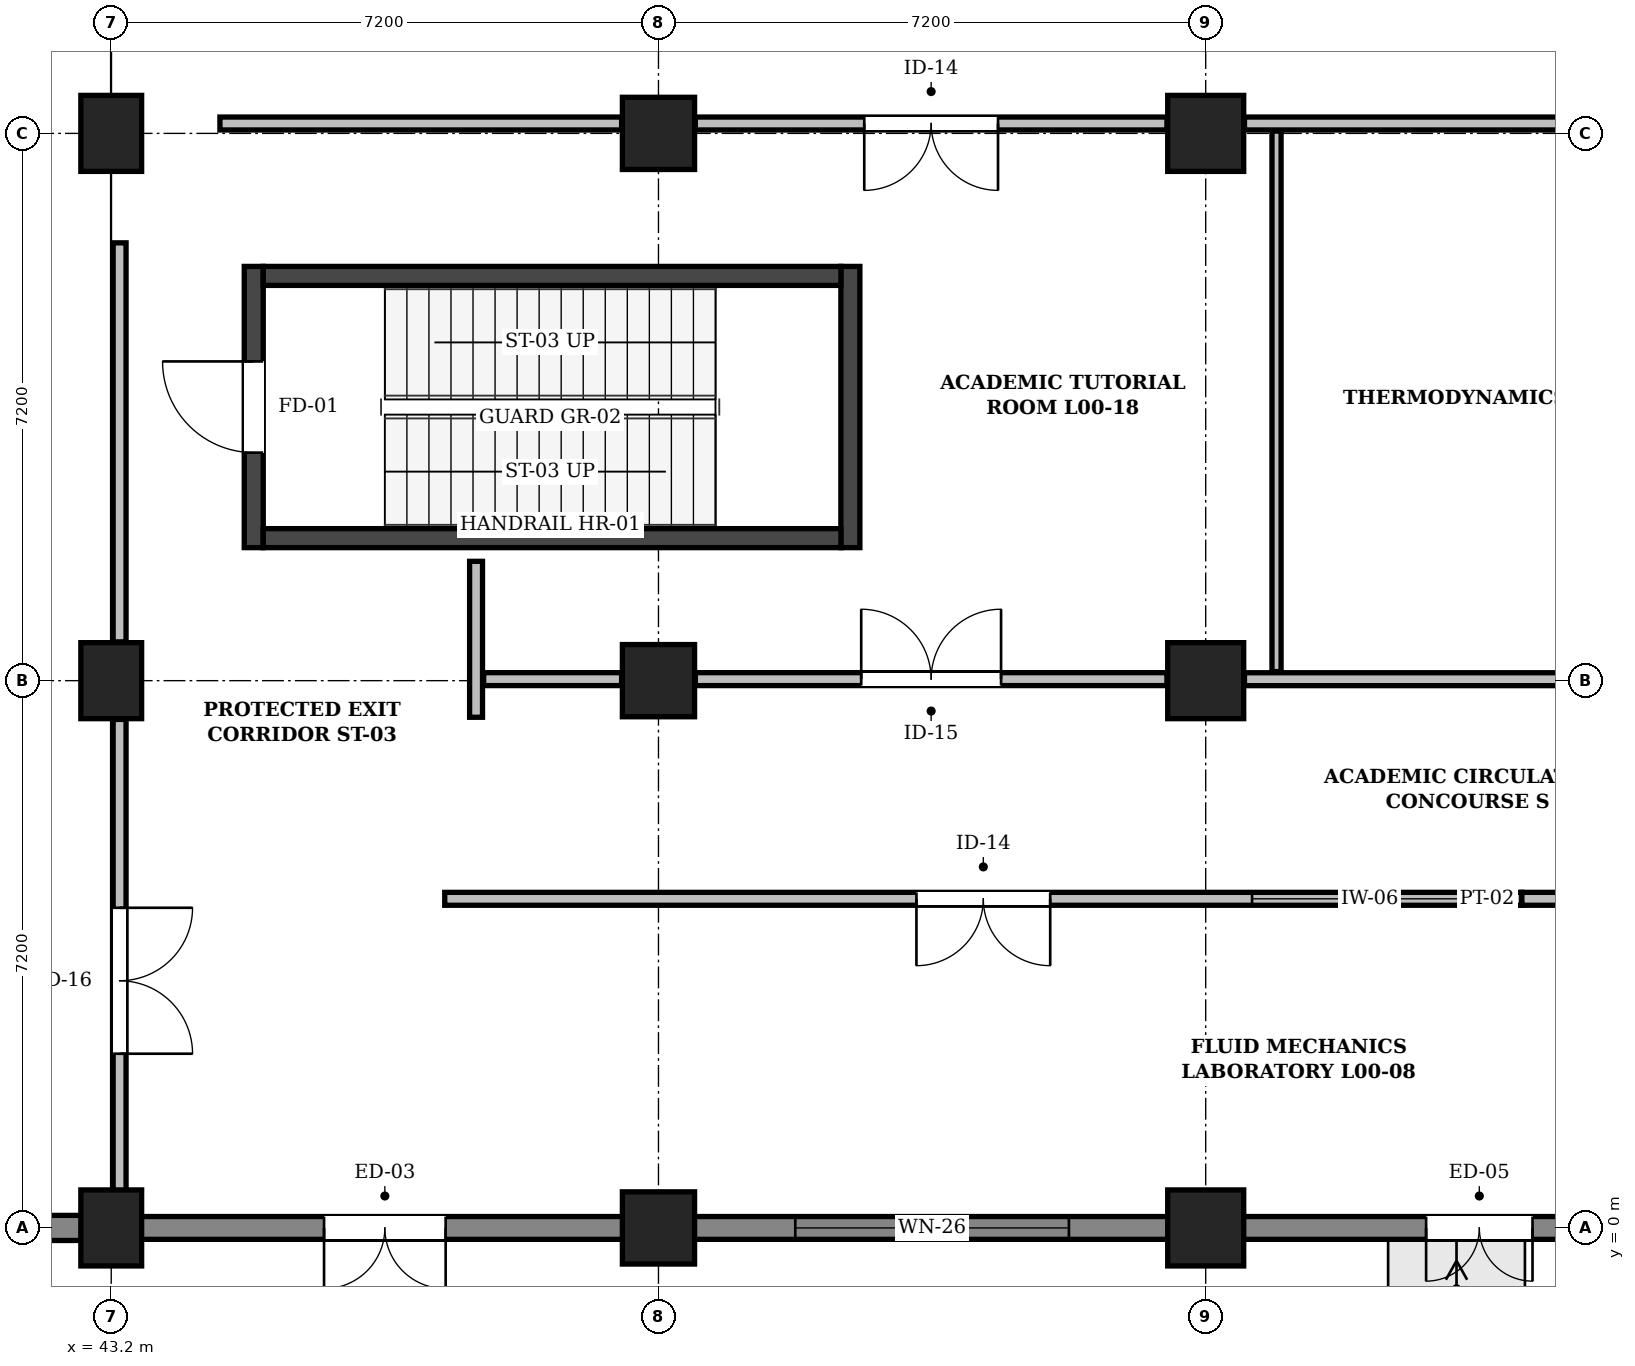
"""IFC4 building model, lengths in metres.
Left out: names, types, materials, properties, quantities, classifications, styles, units other than length and angle.
Written with IfcOpenShell. Run it as: python <this file> out.ifc"""

import sys

from ifc_helpers import new_model, si_unit, direction, frame, frame_2d, origin, origin_2d, place, context, subcontext, project, spatial, rectangle, extrude, element, fill, save


model = new_model("IFC4")
c1 = context("Model", 3, precision=1e-05, world=origin(), true_north=direction((0.0, 1.0)))
c2 = subcontext(c1, "Body", "Model", "MODEL_VIEW")
j1 = project(units=[si_unit("LENGTHUNIT", "METRE"), si_unit("PLANEANGLEUNIT", "RADIAN")], contexts=[c1])
p1 = place(None, origin())
s1 = spatial("IfcSite", under=j1, at=p1, CompositionType="ELEMENT")
p2 = place(p1, origin())
s2 = spatial("IfcBuilding", under=s1, at=p2, CompositionType="ELEMENT")
p3 = place(p2, origin())
s3 = spatial("IfcBuildingStorey", under=s2, at=p3, CompositionType="ELEMENT", Elevation=0.0)
for number, where, z_axis, x_axis in (
    (1, (43.2, 0.0, 0.0), (0.0, 0.0, 1.0), (1.0, 0.0, 0.0)),
    (2, (43.2, 7.2, 0.0), (0.0, 0.0, 1.0), (1.0, 0.0, 0.0)),
    (3, (43.2, 14.4, 0.0), (0.0, 0.0, 1.0), (1.0, 0.0, 0.0)),
):
    element("IfcColumn", number, at=place(p3, frame(where, z_axis=z_axis, x_axis=x_axis)), inside=s3, PredefinedType="COLUMN", context=c2, shape_type="SweptSolid", body=[
        extrude(rectangle(XDim=0.8, YDim=1.0, at=origin_2d()), origin(), (0.0, 0.0, 1.0), 4.8),
    ])
for number, where, z_axis, x_axis in (
    (4, (50.4, 0.0, 0.0), (0.0, 0.0, 1.0), (1.0, 0.0, 0.0)),
    (5, (50.4, 7.2, 0.0), (0.0, 0.0, 1.0), (1.0, 0.0, 0.0)),
    (6, (50.4, 14.4, 0.0), (0.0, 0.0, 1.0), (1.0, 0.0, 0.0)),
):
    element("IfcColumn", number, at=place(p3, frame(where, z_axis=z_axis, x_axis=x_axis)), inside=s3, PredefinedType="COLUMN", context=c2, shape_type="SweptSolid", body=[
        extrude(rectangle(XDim=0.95, YDim=0.95, at=origin_2d()), origin(), (0.0, 0.0, 1.0), 4.8),
    ])
for number, where, z_axis, x_axis in (
    (7, (57.6, 0.0, 0.0), (0.0, 0.0, 1.0), (1.0, 0.0, 0.0)),
    (8, (57.6, 7.2, 0.0), (0.0, 0.0, 1.0), (1.0, 0.0, 0.0)),
    (9, (57.6, 14.4, 0.0), (0.0, 0.0, 1.0), (1.0, 0.0, 0.0)),
):
    element("IfcColumn", number, at=place(p3, frame(where, z_axis=z_axis, x_axis=x_axis)), inside=s3, PredefinedType="COLUMN", context=c2, shape_type="SweptSolid", body=[
        extrude(rectangle(XDim=1.0, YDim=1.0, at=origin_2d()), origin(), (0.0, 0.0, 1.0), 4.8),
    ])
p4 = place(p3, frame((64.8, 0.0, 0.0), z_axis=(0.0, 0.0, 1.0), x_axis=(-1.0, 0.0, 0.0)))
e10 = element("IfcWall", 10, at=p4, inside=s3, PredefinedType="SOLIDWALL", context=c2, shape_type="SweptSolid", body=[
    extrude(rectangle(XDim=7.2, YDim=0.3, at=frame_2d((3.6, 0.0))), origin(), (0.0, 0.0, 1.0), 4.52),
])
p5 = place(p4, frame((2.9, 0.0, 0.0)))
e11 = element("IfcOpeningElement", 11, at=p5, cuts=e10, PredefinedType="OPENING", context=c2, shape_type="SweptSolid", body=[
    extrude(rectangle(XDim=1.4, YDim=2.15, at=frame_2d((0.7, 1.075))), frame((0.0, 0.162, 0.0), z_axis=(0.0, -1.0, 0.0), x_axis=(1.0, 0.0, 0.0)), (0.0, 0.0, 1.0), 0.324),
])
p6 = place(p3, frame((57.6, 0.0, 0.0), z_axis=(0.0, 0.0, 1.0), x_axis=(-1.0, 0.0, 0.0)))
e12 = element("IfcWall", 12, at=p6, inside=s3, PredefinedType="SOLIDWALL", context=c2, shape_type="SweptSolid", body=[
    extrude(rectangle(XDim=7.2, YDim=0.3, at=frame_2d((3.6, 0.0))), origin(), (0.0, 0.0, 1.0), 4.52),
])
p7 = place(p6, frame((1.8, 0.0, 0.95)))
e13 = element("IfcOpeningElement", 13, at=p7, cuts=e12, PredefinedType="OPENING", context=c2, shape_type="SweptSolid", body=[
    extrude(rectangle(XDim=3.6, YDim=1.55, at=frame_2d((1.8, 0.775))), frame((0.0, 0.162, 0.0), z_axis=(0.0, -1.0, 0.0), x_axis=(1.0, 0.0, 0.0)), (0.0, 0.0, 1.0), 0.324),
])
p8 = place(p3, frame((50.4, 0.0, 0.0), z_axis=(0.0, 0.0, 1.0), x_axis=(-1.0, 0.0, 0.0)))
e14 = element("IfcWall", 14, at=p8, inside=s3, PredefinedType="SOLIDWALL", context=c2, shape_type="SweptSolid", body=[
    extrude(rectangle(XDim=7.2, YDim=0.3, at=frame_2d((3.6, 0.0))), origin(), (0.0, 0.0, 1.0), 4.52),
])
p9 = place(p8, frame((2.8, 0.0, 0.0)))
e15 = element("IfcOpeningElement", 15, at=p9, cuts=e14, PredefinedType="OPENING", context=c2, shape_type="SweptSolid", body=[
    extrude(rectangle(XDim=1.6, YDim=2.2, at=frame_2d((0.8, 1.1))), frame((0.0, 0.162, 0.0), z_axis=(0.0, -1.0, 0.0), x_axis=(1.0, 0.0, 0.0)), (0.0, 0.0, 1.0), 0.324),
])
p10 = place(p3, frame((43.2, 0.0, 0.0), z_axis=(0.0, 0.0, 1.0), x_axis=(-1.0, 0.0, 0.0)))
e16 = element("IfcWall", 16, at=p10, inside=s3, PredefinedType="SOLIDWALL", context=c2, shape_type="SweptSolid", body=[
    extrude(rectangle(XDim=7.2, YDim=0.33, at=frame_2d((3.6, 0.0))), origin(), (0.0, 0.0, 1.0), 4.52),
])
p11 = place(p3, frame((45.075, 8.95, 0.0), z_axis=(0.0, 0.0, 1.0), x_axis=(0.0, 1.0, 0.0)))
e17 = element("IfcWall", 17, at=p11, inside=s3, PredefinedType="SHEAR", context=c2, shape_type="SweptSolid", body=[
    extrude(rectangle(XDim=3.7, YDim=0.25, at=frame_2d((1.85, 0.0))), origin(), (0.0, 0.0, 1.0), 4.55),
])
p12 = place(p11, frame((1.25, 0.0, 0.0)))
e18 = element("IfcOpeningElement", 18, at=p12, cuts=e17, PredefinedType="OPENING", context=c2, shape_type="SweptSolid", body=[
    extrude(rectangle(XDim=1.2, YDim=2.15, at=frame_2d((0.6, 1.075))), frame((0.0, 0.137, 0.0), z_axis=(0.0, -1.0, 0.0), x_axis=(1.0, 0.0, 0.0)), (0.0, 0.0, 1.0), 0.274),
])
p13 = place(p3, frame((52.925, 8.95, 0.0), z_axis=(0.0, 0.0, 1.0), x_axis=(0.0, 1.0, 0.0)))
e19 = element("IfcWall", 19, at=p13, inside=s3, PredefinedType="SHEAR", context=c2, shape_type="SweptSolid", body=[
    extrude(rectangle(XDim=3.7, YDim=0.25, at=frame_2d((1.85, 0.0))), origin(), (0.0, 0.0, 1.0), 4.55),
])
for number, where, z_axis, x_axis in (
    (20, (45.2, 9.075, 0.0), (0.0, 0.0, 1.0), (1.0, 0.0, 0.0)),
    (21, (45.2, 12.525, 0.0), (0.0, 0.0, 1.0), (1.0, 0.0, 0.0)),
):
    element("IfcWall", number, at=place(p3, frame(where, z_axis=z_axis, x_axis=x_axis)), inside=s3, PredefinedType="SHEAR", context=c2, shape_type="SweptSolid", body=[
        extrude(rectangle(XDim=7.6, YDim=0.25, at=frame_2d((3.8, 0.0))), origin(), (0.0, 0.0, 1.0), 4.55),
    ])
p14 = place(p3, frame((43.31, 0.162, 0.0), z_axis=(0.0, 0.0, 1.0), x_axis=(0.0, 1.0, 0.0)))
e22 = element("IfcWall", 22, at=p14, inside=s3, PredefinedType="PARTITIONING", context=c2, shape_type="SweptSolid", body=[
    extrude(rectangle(XDim=6.528, YDim=0.17, at=frame_2d((3.264, 0.0))), origin(), (0.0, 0.0, 1.0), 4.08),
])
p15 = place(p14, frame((2.13, 0.0, 0.0)))
e23 = element("IfcOpeningElement", 23, at=p15, cuts=e22, PredefinedType="OPENING", context=c2, shape_type="SweptSolid", body=[
    extrude(rectangle(XDim=1.92, YDim=2.32, at=frame_2d((0.96, 1.16))), frame((0.0, 0.097, 0.0), z_axis=(0.0, -1.0, 0.0), x_axis=(1.0, 0.0, 0.0)), (0.0, 0.0, 1.0), 0.194),
])
p16 = place(p3, frame((43.31, 7.71, 0.0), z_axis=(0.0, 0.0, 1.0), x_axis=(0.0, 1.0, 0.0)))
e24 = element("IfcWall", 24, at=p16, inside=s3, PredefinedType="PARTITIONING", context=c2, shape_type="SweptSolid", body=[
    extrude(rectangle(XDim=5.25, YDim=0.17, at=frame_2d((2.625, 0.0))), origin(), (0.0, 0.0, 1.0), 4.08),
])
p17 = place(p3, frame((48.0, 6.719, 0.0), z_axis=(0.0, 0.0, 1.0), x_axis=(0.0, 1.0, 0.0)))
e25 = element("IfcWall", 25, at=p17, inside=s3, PredefinedType="PARTITIONING", context=c2, shape_type="SweptSolid", body=[
    extrude(rectangle(XDim=2.052, YDim=0.17, at=frame_2d((1.026, 0.0))), origin(), (0.0, 0.0, 1.0), 4.46),
])
p18 = place(p3, frame((50.885, 14.53, 0.0), z_axis=(0.0, 0.0, 1.0), x_axis=(1.0, 0.0, 0.0)))
e26 = element("IfcWall", 26, at=p18, inside=s3, PredefinedType="PARTITIONING", context=c2, shape_type="SweptSolid", body=[
    extrude(rectangle(XDim=6.205, YDim=0.17, at=frame_2d((3.103, 0.0))), origin(), (0.0, 0.0, 1.0), 3.83),
])
p19 = place(p18, frame((2.222, 0.0, 0.0)))
e27 = element("IfcOpeningElement", 27, at=p19, cuts=e26, PredefinedType="OPENING", context=c2, shape_type="SweptSolid", body=[
    extrude(rectangle(XDim=1.76, YDim=2.3, at=frame_2d((0.88, 1.15))), frame((0.0, 0.097, 0.0), z_axis=(0.0, -1.0, 0.0), x_axis=(1.0, 0.0, 0.0)), (0.0, 0.0, 1.0), 0.194),
])
p20 = place(p3, frame((44.63, 14.53, 0.0), z_axis=(0.0, 0.0, 1.0), x_axis=(1.0, 0.0, 0.0)))
e28 = element("IfcWall", 28, at=p20, inside=s3, PredefinedType="PARTITIONING", context=c2, shape_type="SweptSolid", body=[
    extrude(rectangle(XDim=5.285, YDim=0.17, at=frame_2d((2.643, 0.0))), origin(), (0.0, 0.0, 1.0), 3.83),
])
p21 = place(p3, frame((58.11, 14.53, 0.0), z_axis=(0.0, 0.0, 1.0), x_axis=(1.0, 0.0, 0.0)))
e29 = element("IfcWall", 29, at=p21, inside=s3, PredefinedType="PARTITIONING", context=c2, shape_type="SweptSolid", body=[
    extrude(rectangle(XDim=13.38, YDim=0.17, at=frame_2d((6.69, 0.0))), origin(), (0.0, 0.0, 1.0), 3.63),
])
p22 = place(p21, frame((6.2, 0.0, 0.0)))
e30 = element("IfcOpeningElement", 30, at=p22, cuts=e29, PredefinedType="OPENING", context=c2, shape_type="SweptSolid", body=[
    extrude(rectangle(XDim=0.98, YDim=2.14, at=frame_2d((0.49, 1.07))), frame((0.0, 0.097, 0.0), z_axis=(0.0, -1.0, 0.0), x_axis=(1.0, 0.0, 0.0)), (0.0, 0.0, 1.0), 0.194),
])
p23 = place(p3, frame((47.588, 4.33, 0.0), z_axis=(0.0, 0.0, 1.0), x_axis=(1.0, 0.0, 0.0)))
e31 = element("IfcWall", 31, at=p23, inside=s3, PredefinedType="PARTITIONING", context=c2, shape_type="SweptSolid", body=[
    extrude(rectangle(XDim=14.172, YDim=0.17, at=frame_2d((7.086, 0.0))), origin(), (0.0, 0.0, 1.0), 4.46),
])
p24 = place(p23, frame((6.206, 0.0, 0.0)))
e32 = element("IfcOpeningElement", 32, at=p24, cuts=e31, PredefinedType="OPENING", context=c2, shape_type="SweptSolid", body=[
    extrude(rectangle(XDim=1.76, YDim=2.3, at=frame_2d((0.88, 1.15))), frame((0.0, 0.097, 0.0), z_axis=(0.0, -1.0, 0.0), x_axis=(1.0, 0.0, 0.0)), (0.0, 0.0, 1.0), 0.194),
])
p25 = place(p23, frame((10.622, 0.0, 1.05)))
e33 = element("IfcOpeningElement", 33, at=p25, cuts=e31, PredefinedType="OPENING", context=c2, shape_type="SweptSolid", body=[
    extrude(rectangle(XDim=3.1, YDim=1.15, at=frame_2d((1.55, 0.575))), frame((0.0, 0.097, 0.0), z_axis=(0.0, -1.0, 0.0), x_axis=(1.0, 0.0, 0.0)), (0.0, 0.0, 1.0), 0.194),
])
p26 = place(p3, frame((61.76, 4.33, 0.0), z_axis=(0.0, 0.0, 1.0), x_axis=(1.0, 0.0, 0.0)))
e34 = element("IfcWall", 34, at=p26, inside=s3, PredefinedType="PARTITIONING", context=c2, shape_type="SweptSolid", body=[
    extrude(rectangle(XDim=13.052, YDim=0.17, at=frame_2d((6.526, 0.0))), origin(), (0.0, 0.0, 1.0), 4.46),
])
p27 = place(p26, frame((5.606, 0.0, 0.0)))
e35 = element("IfcOpeningElement", 35, at=p27, cuts=e34, PredefinedType="OPENING", context=c2, shape_type="SweptSolid", body=[
    extrude(rectangle(XDim=1.84, YDim=2.3, at=frame_2d((0.92, 1.15))), frame((0.0, 0.097, 0.0), z_axis=(0.0, -1.0, 0.0), x_axis=(1.0, 0.0, 0.0)), (0.0, 0.0, 1.0), 0.194),
])
p28 = place(p26, frame((11.102, 0.0, 1.05)))
e36 = element("IfcOpeningElement", 36, at=p28, cuts=e34, PredefinedType="OPENING", context=c2, shape_type="SweptSolid", body=[
    extrude(rectangle(XDim=1.5, YDim=1.05, at=frame_2d((0.75, 0.525))), frame((0.0, 0.097, 0.0), z_axis=(0.0, -1.0, 0.0), x_axis=(1.0, 0.0, 0.0)), (0.0, 0.0, 1.0), 0.194),
])
p29 = place(p3, frame((50.885, 7.22, 0.0), z_axis=(0.0, 0.0, 1.0), x_axis=(1.0, 0.0, 0.0)))
e37 = element("IfcWall", 37, at=p29, inside=s3, PredefinedType="PARTITIONING", context=c2, shape_type="SweptSolid", body=[
    extrude(rectangle(XDim=6.205, YDim=0.17, at=frame_2d((3.103, 0.0))), origin(), (0.0, 0.0, 1.0), 3.83),
])
p30 = place(p29, frame((2.183, 0.0, 0.0)))
e38 = element("IfcOpeningElement", 38, at=p30, cuts=e37, PredefinedType="OPENING", context=c2, shape_type="SweptSolid", body=[
    extrude(rectangle(XDim=1.84, YDim=2.3, at=frame_2d((0.92, 1.15))), frame((0.0, 0.097, 0.0), z_axis=(0.0, -1.0, 0.0), x_axis=(1.0, 0.0, 0.0)), (0.0, 0.0, 1.0), 0.194),
])
p31 = place(p3, frame((48.1, 7.22, 0.0), z_axis=(0.0, 0.0, 1.0), x_axis=(1.0, 0.0, 0.0)))
e39 = element("IfcWall", 39, at=p31, inside=s3, PredefinedType="PARTITIONING", context=c2, shape_type="SweptSolid", body=[
    extrude(rectangle(XDim=1.815, YDim=0.17, at=frame_2d((0.907, 0.0))), origin(), (0.0, 0.0, 1.0), 3.83),
])
p32 = place(p3, frame((58.11, 7.219, 0.0), z_axis=(0.0, 0.0, 1.0), x_axis=(1.0, 0.0, 0.0)))
e40 = element("IfcWall", 40, at=p32, inside=s3, PredefinedType="PARTITIONING", context=c2, shape_type="SweptSolid", body=[
    extrude(rectangle(XDim=6.18, YDim=0.17, at=frame_2d((3.09, 0.0))), origin(), (0.0, 0.0, 1.0), 3.83),
])
p33 = place(p3, frame((58.532, 7.319, 0.0), z_axis=(0.0, 0.0, 1.0), x_axis=(0.0, 1.0, 0.0)))
e41 = element("IfcWall", 41, at=p33, inside=s3, PredefinedType="PARTITIONING", context=c2, shape_type="SweptSolid", body=[
    extrude(rectangle(XDim=7.111, YDim=0.12, at=frame_2d((3.555, 0.0))), origin(), (0.0, 0.0, 1.0), 4.46),
])
p34 = place(p5, origin())
e42 = element("IfcDoor", 42, at=p34, inside=s3, OperationType="DOUBLE_DOOR_SINGLE_SWING", PredefinedType="DOOR", context=c2, shape_type="SweptSolid", body=[
    extrude(rectangle(XDim=1.4, YDim=2.15, at=frame_2d((0.7, 1.075))), frame((0.0, 0.025, 0.0), z_axis=(0.0, -1.0, 0.0), x_axis=(1.0, 0.0, 0.0)), (0.0, 0.0, 1.0), 0.05),
])
fill(e11, e42)
p35 = place(p7, origin())
e43 = element("IfcWindow", 43, at=p35, inside=s3, PartitioningType="SINGLE_PANEL", PredefinedType="WINDOW", context=c2, shape_type="SweptSolid", body=[
    extrude(rectangle(XDim=3.6, YDim=1.55, at=frame_2d((1.8, 0.775))), frame((0.0, 0.03, 0.0), z_axis=(0.0, -1.0, 0.0), x_axis=(1.0, 0.0, 0.0)), (0.0, 0.0, 1.0), 0.06),
])
fill(e13, e43)
p36 = place(p9, origin())
e44 = element("IfcDoor", 44, at=p36, inside=s3, OperationType="DOUBLE_DOOR_SINGLE_SWING", PredefinedType="DOOR", context=c2, shape_type="SweptSolid", body=[
    extrude(rectangle(XDim=1.6, YDim=2.2, at=frame_2d((0.8, 1.1))), frame((0.0, 0.025, 0.0), z_axis=(0.0, -1.0, 0.0), x_axis=(1.0, 0.0, 0.0)), (0.0, 0.0, 1.0), 0.05),
])
fill(e15, e44)
p37 = place(p12, origin())
e45 = element("IfcDoor", 45, at=p37, inside=s3, OperationType="SINGLE_SWING_RIGHT", PredefinedType="DOOR", context=c2, shape_type="SweptSolid", body=[
    extrude(rectangle(XDim=1.2, YDim=2.15, at=frame_2d((0.6, 1.075))), frame((0.0, 0.025, 0.0), z_axis=(0.0, -1.0, 0.0), x_axis=(1.0, 0.0, 0.0)), (0.0, 0.0, 1.0), 0.05),
])
fill(e18, e45)
p38 = place(p19, frame((1.76, 0.0, 0.0), z_axis=(0.0, 0.0, 1.0), x_axis=(-1.0, 0.0, 0.0)))
e46 = element("IfcDoor", 46, at=p38, inside=s3, OperationType="DOUBLE_DOOR_SINGLE_SWING", PredefinedType="DOOR", context=c2, shape_type="SweptSolid", body=[
    extrude(rectangle(XDim=1.76, YDim=2.3, at=frame_2d((0.88, 1.15))), frame((0.0, 0.025, 0.0), z_axis=(0.0, -1.0, 0.0), x_axis=(1.0, 0.0, 0.0)), (0.0, 0.0, 1.0), 0.05),
])
fill(e27, e46)
p39 = place(p30, origin())
e47 = element("IfcDoor", 47, at=p39, inside=s3, OperationType="DOUBLE_DOOR_SINGLE_SWING", PredefinedType="DOOR", context=c2, shape_type="SweptSolid", body=[
    extrude(rectangle(XDim=1.84, YDim=2.3, at=frame_2d((0.92, 1.15))), frame((0.0, 0.025, 0.0), z_axis=(0.0, -1.0, 0.0), x_axis=(1.0, 0.0, 0.0)), (0.0, 0.0, 1.0), 0.05),
])
fill(e38, e47)
p40 = place(p15, frame((1.92, 0.0, 0.0), z_axis=(0.0, 0.0, 1.0), x_axis=(-1.0, 0.0, 0.0)))
e48 = element("IfcDoor", 48, at=p40, inside=s3, OperationType="DOUBLE_DOOR_SINGLE_SWING", PredefinedType="DOOR", context=c2, shape_type="SweptSolid", body=[
    extrude(rectangle(XDim=1.92, YDim=2.32, at=frame_2d((0.96, 1.16))), frame((0.0, 0.025, 0.0), z_axis=(0.0, -1.0, 0.0), x_axis=(1.0, 0.0, 0.0)), (0.0, 0.0, 1.0), 0.05),
])
fill(e23, e48)
p41 = place(p24, frame((1.76, 0.0, 0.0), z_axis=(0.0, 0.0, 1.0), x_axis=(-1.0, 0.0, 0.0)))
e49 = element("IfcDoor", 49, at=p41, inside=s3, OperationType="DOUBLE_DOOR_SINGLE_SWING", PredefinedType="DOOR", context=c2, shape_type="SweptSolid", body=[
    extrude(rectangle(XDim=1.76, YDim=2.3, at=frame_2d((0.88, 1.15))), frame((0.0, 0.025, 0.0), z_axis=(0.0, -1.0, 0.0), x_axis=(1.0, 0.0, 0.0)), (0.0, 0.0, 1.0), 0.05),
])
fill(e32, e49)
p42 = place(p25, origin())
e50 = element("IfcWindow", 50, at=p42, inside=s3, PartitioningType="SINGLE_PANEL", PredefinedType="WINDOW", context=c2, shape_type="SweptSolid", body=[
    extrude(rectangle(XDim=3.1, YDim=1.15, at=frame_2d((1.55, 0.575))), frame((0.0, 0.03, 0.0), z_axis=(0.0, -1.0, 0.0), x_axis=(1.0, 0.0, 0.0)), (0.0, 0.0, 1.0), 0.06),
])
fill(e33, e50)
save(model, sys.argv[1])
